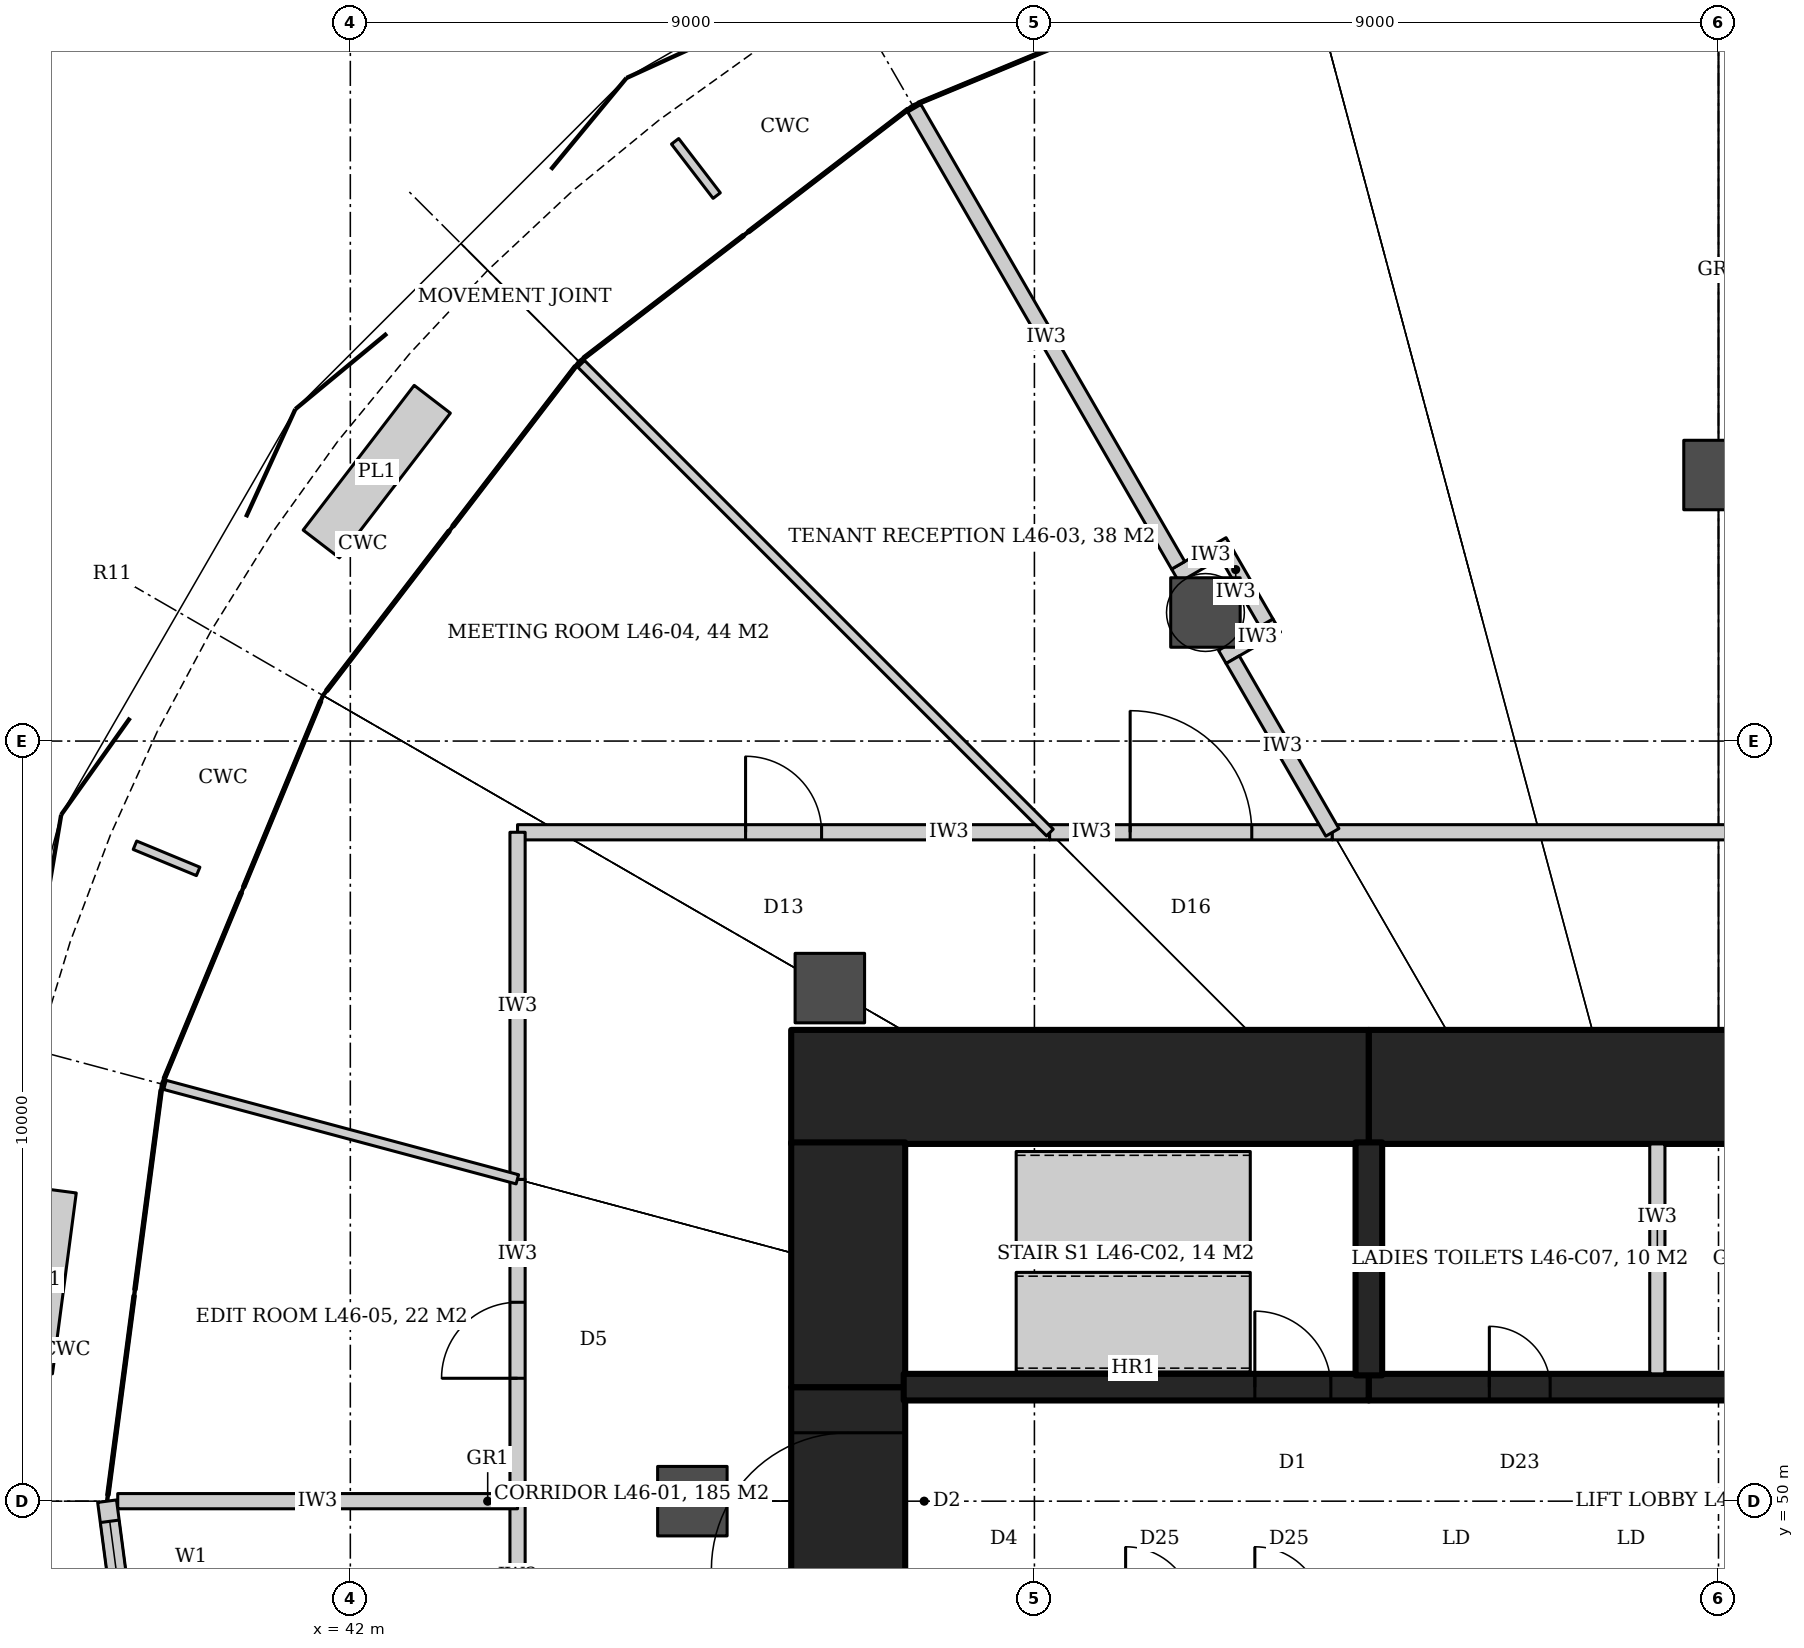
"""IFC4 building model, lengths in metres.
Left out: names, types, materials, properties, quantities, classifications, styles, units other than length and angle.
Written with IfcOpenShell. Run it as: python <this file> out.ifc"""

import sys

from ifc_helpers import new_model, si_unit, direction, frame, frame_2d, origin, origin_2d, place, context, subcontext, project, spatial, rectangle, hollow_circle, extrude, element, fill, save


model = new_model("IFC4")
c1 = context("Model", 3, precision=1e-05, world=origin(), true_north=direction((0.0, 1.0)))
c2 = subcontext(c1, "Body", "Model", "MODEL_VIEW")
j1 = project(units=[si_unit("LENGTHUNIT", "METRE"), si_unit("PLANEANGLEUNIT", "RADIAN")], contexts=[c1])
p1 = place(None, origin())
s1 = spatial("IfcSite", under=j1, at=p1, CompositionType="ELEMENT")
p2 = place(p1, origin())
s2 = spatial("IfcBuilding", under=s1, at=p2, CompositionType="ELEMENT")
p3 = place(p2, frame((0.0, 0.0, 202.4)))
s3 = spatial("IfcBuildingStorey", under=s2, at=p3, CompositionType="ELEMENT", Elevation=202.4)
p4 = place(p3, frame((47.8, 55.45, 0.0), z_axis=(0.0, 0.0, 1.0), x_axis=(1.0, 0.0, 0.0)))
e1 = element("IfcWall", 1, at=p4, inside=s3, PredefinedType="SHEAR", context=c2, shape_type="SweptSolid", body=[
    extrude(rectangle(XDim=7.6, YDim=1.5, at=frame_2d((3.8, 0.0))), origin(), (0.0, 0.0, 1.0), 4.2),
])
p5 = place(p3, frame((55.4, 55.45, 0.0), z_axis=(0.0, 0.0, 1.0), x_axis=(1.0, 0.0, 0.0)))
e2 = element("IfcWall", 2, at=p5, inside=s3, PredefinedType="SHEAR", context=c2, shape_type="SweptSolid", body=[
    extrude(rectangle(XDim=9.2, YDim=1.5, at=frame_2d((4.6, 0.0))), origin(), (0.0, 0.0, 1.0), 4.2),
])
p6 = place(p3, frame((48.55, 48.5, 0.0), z_axis=(0.0, 0.0, 1.0), x_axis=(0.0, 1.0, 0.0)))
e3 = element("IfcWall", 3, at=p6, inside=s3, PredefinedType="SHEAR", context=c2, shape_type="SweptSolid", body=[
    extrude(rectangle(XDim=3.0, YDim=1.5, at=frame_2d((1.5, 0.0))), origin(), (0.0, 0.0, 1.0), 4.2),
])
p7 = place(p6, frame((0.6, 0.0, 0.0)))
e4 = element("IfcOpeningElement", 4, at=p7, cuts=e3, PredefinedType="OPENING", context=c2, shape_type="SweptSolid", body=[
    extrude(rectangle(XDim=1.8, YDim=2.1, at=frame_2d((0.9, 1.05))), frame((0.0, 0.76, 0.0), z_axis=(0.0, -1.0, 0.0), x_axis=(1.0, 0.0, 0.0)), (0.0, 0.0, 1.0), 1.52),
])
p8 = place(p3, frame((48.55, 51.5, 0.0), z_axis=(0.0, 0.0, 1.0), x_axis=(0.0, 1.0, 0.0)))
e5 = element("IfcWall", 5, at=p8, inside=s3, PredefinedType="SHEAR", context=c2, shape_type="SweptSolid", body=[
    extrude(rectangle(XDim=3.22, YDim=1.5, at=frame_2d((1.61, 0.0))), origin(), (0.0, 0.0, 1.0), 4.2),
])
p9 = place(p3, frame((49.28, 51.5, 0.0), z_axis=(0.0, 0.0, 1.0), x_axis=(1.0, 0.0, 0.0)))
e6 = element("IfcWall", 6, at=p9, inside=s3, PredefinedType="SHEAR", context=c2, shape_type="SweptSolid", body=[
    extrude(rectangle(XDim=6.12, YDim=0.35, at=frame_2d((3.06, 0.0))), origin(), (0.0, 0.0, 1.0), 4.2),
])
p10 = place(p9, frame((4.62, 0.0, 0.0)))
e7 = element("IfcOpeningElement", 7, at=p10, cuts=e6, PredefinedType="OPENING", context=c2, shape_type="SweptSolid", body=[
    extrude(rectangle(XDim=1.0, YDim=2.1, at=frame_2d((0.5, 1.05))), frame((0.0, 0.185, 0.0), z_axis=(0.0, -1.0, 0.0), x_axis=(1.0, 0.0, 0.0)), (0.0, 0.0, 1.0), 0.37),
])
p11 = place(p3, frame((55.4, 51.5, 0.0), z_axis=(0.0, 0.0, 1.0), x_axis=(1.0, 0.0, 0.0)))
e8 = element("IfcWall", 8, at=p11, inside=s3, PredefinedType="SHEAR", context=c2, shape_type="SweptSolid", body=[
    extrude(rectangle(XDim=9.2, YDim=0.35, at=frame_2d((4.6, 0.0))), origin(), (0.0, 0.0, 1.0), 4.2),
])
p12 = place(p11, frame((1.585, 0.0, 0.0)))
e9 = element("IfcOpeningElement", 9, at=p12, cuts=e8, PredefinedType="OPENING", context=c2, shape_type="SweptSolid", body=[
    extrude(rectangle(XDim=0.8, YDim=2.1, at=frame_2d((0.4, 1.05))), frame((0.0, 0.185, 0.0), z_axis=(0.0, -1.0, 0.0), x_axis=(1.0, 0.0, 0.0)), (0.0, 0.0, 1.0), 0.37),
])
p13 = place(p11, frame((4.703, 0.0, 0.0)))
e10 = element("IfcOpeningElement", 10, at=p13, cuts=e8, PredefinedType="OPENING", context=c2, shape_type="SweptSolid", body=[
    extrude(rectangle(XDim=0.8, YDim=2.1, at=frame_2d((0.4, 1.05))), frame((0.0, 0.185, 0.0), z_axis=(0.0, -1.0, 0.0), x_axis=(1.0, 0.0, 0.0)), (0.0, 0.0, 1.0), 0.37),
])
p14 = place(p11, frame((7.318, 0.0, 0.0)))
e11 = element("IfcOpeningElement", 11, at=p14, cuts=e8, PredefinedType="OPENING", context=c2, shape_type="SweptSolid", body=[
    extrude(rectangle(XDim=0.8, YDim=2.1, at=frame_2d((0.4, 1.05))), frame((0.0, 0.185, 0.0), z_axis=(0.0, -1.0, 0.0), x_axis=(1.0, 0.0, 0.0)), (0.0, 0.0, 1.0), 0.37),
])
p15 = place(p3, frame((55.4, 51.655, 0.0), z_axis=(0.0, 0.0, 1.0), x_axis=(0.0, 1.0, 0.0)))
e12 = element("IfcWall", 12, at=p15, inside=s3, PredefinedType="SHEAR", context=c2, shape_type="SweptSolid", body=[
    extrude(rectangle(XDim=3.065, YDim=0.35, at=frame_2d((1.532, 0.0))), origin(), (0.0, 0.0, 1.0), 4.2),
])
for number, where, z_axis, x_axis in (
    (13, (60.0, 63.5, 0.0), (0.0, 0.0, 1.0), (1.0, 0.0, 0.0)),
    (14, (53.25, 61.691, 0.0), (0.0, 0.0, 1.0), (1.0, 0.0, 0.0)),
    (15, (48.309, 56.75, 0.0), (0.0, 0.0, 1.0), (1.0, 0.0, 0.0)),
    (16, (46.5, 50.0, 0.0), (0.0, 0.0, 1.0), (1.0, 0.0, 0.0)),
):
    element("IfcColumn", number, at=place(p3, frame(where, z_axis=z_axis, x_axis=x_axis)), inside=s3, PredefinedType="COLUMN", context=c2, shape_type="SweptSolid", body=[
        extrude(hollow_circle(Radius=0.457, WallThickness=0.045, at=origin_2d()), origin(), (0.0, 0.0, 1.0), 4.2),
    ])
p16 = place(p3, frame((44.2, 58.8, 0.0), z_axis=(0.0, 0.0, 1.0), x_axis=(1.0, 0.0, 0.0)))
e17 = element("IfcWall", 17, at=p16, inside=s3, PredefinedType="PARTITIONING", context=c2, shape_type="SweptSolid", body=[
    extrude(rectangle(XDim=7.0, YDim=0.2, at=frame_2d((3.5, 0.0))), origin(), (0.0, 0.0, 1.0), 3.012),
])
p17 = place(p16, frame((3.0, 0.0, 0.0)))
e18 = element("IfcOpeningElement", 18, at=p17, cuts=e17, PredefinedType="OPENING", context=c2, shape_type="SweptSolid", body=[
    extrude(rectangle(XDim=1.0, YDim=2.4, at=frame_2d((0.5, 1.2))), frame((0.0, 0.11, 0.0), z_axis=(0.0, -1.0, 0.0), x_axis=(1.0, 0.0, 0.0)), (0.0, 0.0, 1.0), 0.22),
])
p18 = place(p3, frame((51.2, 58.8, 0.0), z_axis=(0.0, 0.0, 1.0), x_axis=(1.0, 0.0, 0.0)))
e19 = element("IfcWall", 19, at=p18, inside=s3, PredefinedType="PARTITIONING", context=c2, shape_type="SweptSolid", body=[
    extrude(rectangle(XDim=3.719, YDim=0.2, at=frame_2d((1.86, 0.0))), origin(), (0.0, 0.0, 1.0), 3.04),
])
p19 = place(p18, frame((1.06, 0.0, 0.0)))
e20 = element("IfcOpeningElement", 20, at=p19, cuts=e19, PredefinedType="OPENING", context=c2, shape_type="SweptSolid", body=[
    extrude(rectangle(XDim=1.6, YDim=2.4, at=frame_2d((0.8, 1.2))), frame((0.0, 0.11, 0.0), z_axis=(0.0, -1.0, 0.0), x_axis=(1.0, 0.0, 0.0)), (0.0, 0.0, 1.0), 0.22),
])
p20 = place(p3, frame((54.919, 58.8, 0.0), z_axis=(0.0, 0.0, 1.0), x_axis=(1.0, 0.0, 0.0)))
e21 = element("IfcWall", 21, at=p20, inside=s3, PredefinedType="PARTITIONING", context=c2, shape_type="SweptSolid", body=[
    extrude(rectangle(XDim=20.881, YDim=0.2, at=frame_2d((10.44, 0.0))), origin(), (0.0, 0.0, 1.0), 3.012),
])
p21 = place(p20, frame((9.44, 0.0, 0.0)))
e22 = element("IfcOpeningElement", 22, at=p21, cuts=e21, PredefinedType="OPENING", context=c2, shape_type="SweptSolid", body=[
    extrude(rectangle(XDim=2.0, YDim=2.1, at=frame_2d((1.0, 1.05))), frame((0.0, 0.11, 0.0), z_axis=(0.0, -1.0, 0.0), x_axis=(1.0, 0.0, 0.0)), (0.0, 0.0, 1.0), 0.22),
])
p22 = place(p3, frame((44.2, 45.766, 0.0), z_axis=(0.0, 0.0, 1.0), x_axis=(0.0, 1.0, 0.0)))
e23 = element("IfcWall", 23, at=p22, inside=s3, PredefinedType="PARTITIONING", context=c2, shape_type="SweptSolid", body=[
    extrude(rectangle(XDim=4.234, YDim=0.2, at=frame_2d((2.117, 0.0))), origin(), (0.0, 0.0, 1.0), 3.012),
])
p23 = place(p22, frame((1.617, 0.0, 0.0)))
e24 = element("IfcOpeningElement", 24, at=p23, cuts=e23, PredefinedType="OPENING", context=c2, shape_type="SweptSolid", body=[
    extrude(rectangle(XDim=1.0, YDim=2.1, at=frame_2d((0.5, 1.05))), frame((0.0, 0.11, 0.0), z_axis=(0.0, -1.0, 0.0), x_axis=(1.0, 0.0, 0.0)), (0.0, 0.0, 1.0), 0.22),
])
p24 = place(p3, frame((44.2, 50.0, 0.0), z_axis=(0.0, 0.0, 1.0), x_axis=(0.0, 1.0, 0.0)))
e25 = element("IfcWall", 25, at=p24, inside=s3, PredefinedType="PARTITIONING", context=c2, shape_type="SweptSolid", body=[
    extrude(rectangle(XDim=4.234, YDim=0.2, at=frame_2d((2.117, 0.0))), origin(), (0.0, 0.0, 1.0), 3.012),
])
p25 = place(p24, frame((1.617, 0.0, 0.0)))
e26 = element("IfcOpeningElement", 26, at=p25, cuts=e25, PredefinedType="OPENING", context=c2, shape_type="SweptSolid", body=[
    extrude(rectangle(XDim=1.0, YDim=2.1, at=frame_2d((0.5, 1.05))), frame((0.0, 0.11, 0.0), z_axis=(0.0, -1.0, 0.0), x_axis=(1.0, 0.0, 0.0)), (0.0, 0.0, 1.0), 0.22),
])
p26 = place(p3, frame((44.2, 54.234, 0.0), z_axis=(0.0, 0.0, 1.0), x_axis=(0.0, 1.0, 0.0)))
e27 = element("IfcWall", 27, at=p26, inside=s3, PredefinedType="PARTITIONING", context=c2, shape_type="SweptSolid", body=[
    extrude(rectangle(XDim=4.566, YDim=0.2, at=frame_2d((2.283, 0.0))), origin(), (0.0, 0.0, 1.0), 3.012),
])
for number, where, z_axis, x_axis in (
    (28, (53.472, 61.107, 0.0), (0.0, 0.0, 1.0), (0.866, 0.5, 0.0)),
    (29, (52.855, 62.176, 0.0), (0.0, 0.0, 1.0), (0.866, 0.5, 0.0)),
):
    element("IfcWall", number, at=place(p3, frame(where, z_axis=z_axis, x_axis=x_axis)), inside=s3, PredefinedType="PARTITIONING", context=c2, shape_type="SweptSolid", body=[
        extrude(rectangle(XDim=0.827, YDim=0.2, at=frame_2d((0.414, 0.0))), origin(), (0.0, 0.0, 1.0), 3.012),
    ])
p27 = place(p3, frame((54.052, 61.557, 0.0), z_axis=(0.0, 0.0, 1.0), x_axis=(-0.500049439734, 0.865996857859, 0.0)))
e30 = element("IfcWall", 30, at=p27, inside=s3, PredefinedType="PARTITIONING", context=c2, shape_type="SweptSolid", body=[
    extrude(rectangle(XDim=1.034, YDim=0.2, at=frame_2d((0.517, 0.0))), origin(), (0.0, 0.0, 1.0), 3.012),
])
p28 = place(p3, frame((54.92, 58.799, 0.0), z_axis=(0.0, 0.0, 1.0), x_axis=(-0.500023253097, 0.866011978186, 0.0)))
e31 = element("IfcWall", 31, at=p28, inside=s3, PredefinedType="PARTITIONING", context=c2, shape_type="SweptSolid", body=[
    extrude(rectangle(XDim=2.623, YDim=0.2, at=frame_2d((1.312, 0.0))), origin(), (0.0, 0.0, 1.0), 3.04),
])
p29 = place(p3, frame((52.892, 62.312, 0.0), z_axis=(0.0, 0.0, 1.0), x_axis=(-0.500011609405, 0.866018700987, 0.0)))
e32 = element("IfcWall", 32, at=p29, inside=s3, PredefinedType="PARTITIONING", context=c2, shape_type="SweptSolid", body=[
    extrude(rectangle(XDim=6.943, YDim=0.2, at=frame_2d((3.472, 0.0))), origin(), (0.0, 0.0, 1.0), 3.012),
])
p30 = place(p3, frame((51.204, 58.796, 0.0), z_axis=(0.0, 0.0, 1.0), x_axis=(-0.707106781187, 0.707106781187, 0.0)))
e33 = element("IfcWall", 33, at=p30, inside=s3, PredefinedType="PARTITIONING", context=c2, shape_type="SweptSolid", body=[
    extrude(rectangle(XDim=8.72, YDim=0.125, at=frame_2d((4.36, 0.0))), origin(), (0.0, 0.0, 1.0), 3.012),
])
p31 = place(p3, frame((44.198, 54.234, 0.0), z_axis=(0.0, 0.0, 1.0), x_axis=(-0.965933749146, 0.258789474786, 0.0)))
e34 = element("IfcWall", 34, at=p31, inside=s3, PredefinedType="PARTITIONING", context=c2, shape_type="SweptSolid", body=[
    extrude(rectangle(XDim=4.8, YDim=0.125, at=frame_2d((2.4, 0.0))), origin(), (0.0, 0.0, 1.0), 3.012),
])
p32 = place(p3, frame((44.2, 50.0, 0.0), z_axis=(0.0, 0.0, 1.0), x_axis=(-1.0, 0.0, 0.0)))
e35 = element("IfcWall", 35, at=p32, inside=s3, PredefinedType="PARTITIONING", context=c2, shape_type="SweptSolid", body=[
    extrude(rectangle(XDim=5.26, YDim=0.2, at=frame_2d((2.63, 0.0))), origin(), (0.0, 0.0, 1.0), 3.012),
])
p33 = place(p3, frame((38.8, 50.0, 0.0), z_axis=(0.0, 0.0, 1.0), x_axis=(0.130530967061, -0.991444232742, 0.0)))
e36 = element("IfcWall", 36, at=p33, inside=s3, PredefinedType="SOLIDWALL", context=c2, shape_type="SweptSolid", body=[
    extrude(rectangle(XDim=5.534, YDim=0.25, at=frame_2d((2.767, 0.0))), origin(), (0.0, 0.0, 1.0), 4.04),
])
p34 = place(p33, frame((1.867, 0.0, 0.0)))
e37 = element("IfcOpeningElement", 37, at=p34, cuts=e36, PredefinedType="OPENING", context=c2, shape_type="SweptSolid", body=[
    extrude(rectangle(XDim=1.8, YDim=2.4, at=frame_2d((0.9, 1.2))), frame((0.0, 0.135, 0.0), z_axis=(0.0, -1.0, 0.0), x_axis=(1.0, 0.0, 0.0)), (0.0, 0.0, 1.0), 0.27),
])
p35 = place(p33, frame((0.267, 0.0, 0.0)))
e38 = element("IfcOpeningElement", 38, at=p35, cuts=e36, PredefinedType="OPENING", context=c2, shape_type="SweptSolid", body=[
    extrude(rectangle(XDim=1.2, YDim=2.4, at=frame_2d((0.6, 1.2))), frame((0.0, 0.135, 0.0), z_axis=(0.0, -1.0, 0.0), x_axis=(1.0, 0.0, 0.0)), (0.0, 0.0, 1.0), 0.27),
])
p36 = place(p33, frame((4.067, 0.0, 0.0)))
e39 = element("IfcOpeningElement", 39, at=p36, cuts=e36, PredefinedType="OPENING", context=c2, shape_type="SweptSolid", body=[
    extrude(rectangle(XDim=1.2, YDim=2.4, at=frame_2d((0.6, 1.2))), frame((0.0, 0.135, 0.0), z_axis=(0.0, -1.0, 0.0), x_axis=(1.0, 0.0, 0.0)), (0.0, 0.0, 1.0), 0.27),
])
p37 = place(p3, frame((59.196, 51.675, 0.0), z_axis=(0.0, 0.0, 1.0), x_axis=(0.0, 1.0, 0.0)))
e40 = element("IfcWall", 40, at=p37, inside=s3, PredefinedType="PARTITIONING", context=c2, shape_type="SweptSolid", body=[
    extrude(rectangle(XDim=3.025, YDim=0.2, at=frame_2d((1.512, 0.0))), origin(), (0.0, 0.0, 1.0), 4.04),
])
p38 = place(p19, origin())
e41 = element("IfcDoor", 41, at=p38, inside=s3, OperationType="DOUBLE_DOOR_DOUBLE_SWING", PredefinedType="DOOR", context=c2, shape_type="SweptSolid", body=[
    extrude(rectangle(XDim=1.6, YDim=2.4, at=frame_2d((0.8, 1.2))), frame((0.0, 0.025, 0.0), z_axis=(0.0, -1.0, 0.0), x_axis=(1.0, 0.0, 0.0)), (0.0, 0.0, 1.0), 0.05),
])
fill(e20, e41)
p39 = place(p17, origin())
e42 = element("IfcDoor", 42, at=p39, inside=s3, OperationType="SINGLE_SWING_LEFT", PredefinedType="DOOR", context=c2, shape_type="SweptSolid", body=[
    extrude(rectangle(XDim=1.0, YDim=2.4, at=frame_2d((0.5, 1.2))), frame((0.0, 0.025, 0.0), z_axis=(0.0, -1.0, 0.0), x_axis=(1.0, 0.0, 0.0)), (0.0, 0.0, 1.0), 0.05),
])
fill(e18, e42)
p40 = place(p25, origin())
e43 = element("IfcDoor", 43, at=p40, inside=s3, OperationType="SINGLE_SWING_LEFT", PredefinedType="DOOR", context=c2, shape_type="SweptSolid", body=[
    extrude(rectangle(XDim=1.0, YDim=2.1, at=frame_2d((0.5, 1.05))), frame((0.0, 0.025, 0.0), z_axis=(0.0, -1.0, 0.0), x_axis=(1.0, 0.0, 0.0)), (0.0, 0.0, 1.0), 0.05),
])
fill(e26, e43)
p41 = place(p35, origin())
e44 = element("IfcWindow", 44, at=p41, inside=s3, PartitioningType="SINGLE_PANEL", PredefinedType="WINDOW", context=c2, shape_type="SweptSolid", body=[
    extrude(rectangle(XDim=1.2, YDim=2.4, at=frame_2d((0.6, 1.2))), frame((0.0, 0.03, 0.0), z_axis=(0.0, -1.0, 0.0), x_axis=(1.0, 0.0, 0.0)), (0.0, 0.0, 1.0), 0.06),
])
fill(e38, e44)
p42 = place(p10, origin())
e45 = element("IfcDoor", 45, at=p42, inside=s3, OperationType="SINGLE_SWING_LEFT", PredefinedType="DOOR", context=c2, shape_type="SweptSolid", body=[
    extrude(rectangle(XDim=1.0, YDim=2.1, at=frame_2d((0.5, 1.05))), frame((0.0, 0.025, 0.0), z_axis=(0.0, -1.0, 0.0), x_axis=(1.0, 0.0, 0.0)), (0.0, 0.0, 1.0), 0.05),
])
fill(e7, e45)
p43 = place(p7, origin())
e46 = element("IfcDoor", 46, at=p43, inside=s3, OperationType="DOUBLE_DOOR_DOUBLE_SWING", PredefinedType="DOOR", context=c2, shape_type="SweptSolid", body=[
    extrude(rectangle(XDim=1.8, YDim=2.1, at=frame_2d((0.9, 1.05))), frame((0.0, 0.025, 0.0), z_axis=(0.0, -1.0, 0.0), x_axis=(1.0, 0.0, 0.0)), (0.0, 0.0, 1.0), 0.05),
])
fill(e4, e46)
p44 = place(p12, origin())
e47 = element("IfcDoor", 47, at=p44, inside=s3, OperationType="SINGLE_SWING_LEFT", PredefinedType="DOOR", context=c2, shape_type="SweptSolid", body=[
    extrude(rectangle(XDim=0.8, YDim=2.1, at=frame_2d((0.4, 1.05))), frame((0.0, 0.025, 0.0), z_axis=(0.0, -1.0, 0.0), x_axis=(1.0, 0.0, 0.0)), (0.0, 0.0, 1.0), 0.05),
])
fill(e9, e47)
save(model, sys.argv[1])
